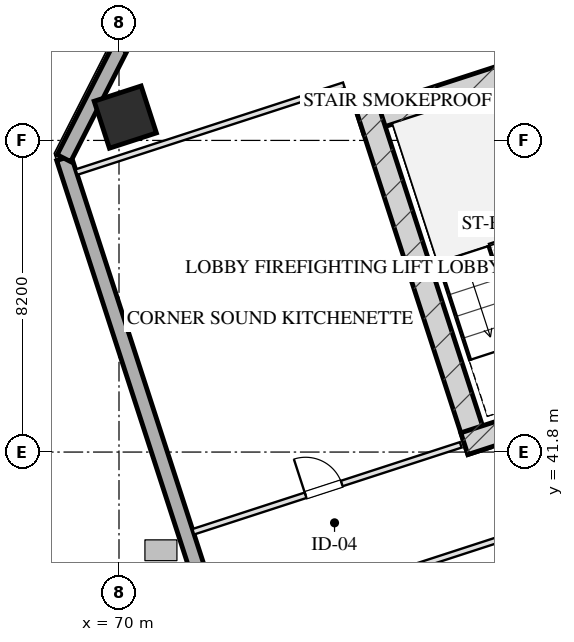
"""IFC4 building model, lengths in metres.
Left out: names, types, materials, properties, quantities, classifications, styles, units other than length and angle.
Written with IfcOpenShell. Run it as: python <this file> out.ifc"""

import sys

from ifc_helpers import new_model, si_unit, direction, frame, frame_2d, origin, origin_2d, place, context, subcontext, project, spatial, rectangle, hollow_rectangle, extrude, element, fill, save


model = new_model("IFC4")
c1 = context("Model", 3, precision=1e-05, world=origin(), true_north=direction((0.0, 1.0)))
c2 = subcontext(c1, "Body", "Model", "MODEL_VIEW")
j1 = project(units=[si_unit("LENGTHUNIT", "METRE"), si_unit("PLANEANGLEUNIT", "RADIAN")], contexts=[c1])
p1 = place(None, origin())
s1 = spatial("IfcSite", under=j1, at=p1, CompositionType="ELEMENT")
p2 = place(p1, origin())
s2 = spatial("IfcBuilding", under=s1, at=p2, CompositionType="ELEMENT")
p3 = place(p2, frame((0.0, 0.0, 173.65)))
s3 = spatial("IfcBuildingStorey", under=s2, at=p3, CompositionType="ELEMENT", Elevation=173.65)
p4 = place(p3, frame((76.344, 50.466, 0.0), z_axis=(0.0, 0.0, 1.0), x_axis=(0.951055727519, 0.309019421968, 0.0)))
e1 = element("IfcWall", 1, at=p4, inside=s3, PredefinedType="SHEAR", context=c2, shape_type="SweptSolid", body=[
    extrude(rectangle(XDim=16.4, YDim=0.6, at=frame_2d((8.2, 0.0))), origin(), (0.0, 0.0, 1.0), 3.45),
])
p5 = place(p3, frame((79.466, 41.828, 0.0), z_axis=(0.0, 0.0, 1.0), x_axis=(-0.309041232772, 0.951048640421, 0.0)))
e2 = element("IfcWall", 2, at=p5, inside=s3, PredefinedType="SHEAR", context=c2, shape_type="SweptSolid", body=[
    extrude(rectangle(XDim=9.48, YDim=0.6, at=frame_2d((4.74, 0.0))), origin(), (0.0, 0.0, 1.0), 3.45),
])
p6 = place(p3, frame((79.087, 42.021, 0.0), z_axis=(0.0, 0.0, 1.0), x_axis=(0.951062550203, 0.3089984233, 0.0)))
e3 = element("IfcWall", 3, at=p6, inside=s3, PredefinedType="SHEAR", context=c2, shape_type="SweptSolid", body=[
    extrude(rectangle(XDim=4.22, YDim=0.6, at=frame_2d((2.11, 0.0))), origin(), (0.0, 0.0, 1.0), 3.45),
])
p7 = place(p3, frame((70.165, 50.614, 0.0), z_axis=(0.0, 0.0, 1.0), x_axis=(0.951056516295, 0.309016994375, 0.0)))
e4 = element("IfcColumn", 4, at=p7, inside=s3, PredefinedType="COLUMN", context=c2, shape_type="SweptSolid", body=[
    extrude(hollow_rectangle(XDim=1.3, YDim=1.3, WallThickness=0.045, at=origin_2d()), origin(), (0.0, 0.0, 1.0), 3.451),
])
p8 = place(p3, frame((81.776, 8.827, 0.0), z_axis=(0.0, 0.0, 1.0), x_axis=(-0.309014228706, 0.951057414911, 0.0)))
e5 = element("IfcWall", 5, at=p8, inside=s3, PredefinedType="SOLIDWALL", context=c2, shape_type="SweptSolid", body=[
    extrude(rectangle(XDim=42.8, YDim=0.4, at=frame_2d((21.4, 0.0))), origin(), (0.0, 0.0, 1.0), 2.61),
])
p9 = place(p8, frame((18.25, 0.0, 0.0)))
e6 = element("IfcOpeningElement", 6, at=p9, cuts=e5, PredefinedType="OPENING", context=c2, shape_type="SweptSolid", body=[
    extrude(rectangle(XDim=1.1, YDim=2.15, at=frame_2d((0.55, 1.075))), frame((0.0, 0.21, 0.0), z_axis=(0.0, -1.0, 0.0), x_axis=(1.0, 0.0, 0.0)), (0.0, 0.0, 1.0), 0.42),
])
p10 = place(p3, frame((68.551, 49.532, 0.0), z_axis=(0.0, 0.0, 1.0), x_axis=(0.454019523198, 0.890991735402, 0.0)))
e7 = element("IfcWall", 7, at=p10, inside=s3, PredefinedType="SOLIDWALL", context=c2, shape_type="SweptSolid", body=[
    extrude(rectangle(XDim=3.394, YDim=0.4, at=frame_2d((1.697, 0.0))), origin(), (0.0, 0.0, 1.0), 2.61),
])
p11 = place(p3, frame((68.88, 49.166, 0.0), z_axis=(0.0, 0.0, 1.0), x_axis=(0.951060977215, 0.309003264738, 0.0)))
e8 = element("IfcWall", 8, at=p11, inside=s3, PredefinedType="PARTITIONING", context=c2, shape_type="SweptSolid", body=[
    extrude(rectangle(XDim=7.4, YDim=0.15, at=frame_2d((3.7, 0.0))), origin(), (0.0, 0.0, 1.0), 3.175),
])
p12 = place(p3, frame((71.955, 39.703, 0.0), z_axis=(0.0, 0.0, 1.0), x_axis=(0.951060977215, 0.309003264738, 0.0)))
e9 = element("IfcWall", 9, at=p12, inside=s3, PredefinedType="PARTITIONING", context=c2, shape_type="SweptSolid", body=[
    extrude(rectangle(XDim=7.4, YDim=0.15, at=frame_2d((3.7, 0.0))), origin(), (0.0, 0.0, 1.0), 3.175),
])
p13 = place(p12, frame((3.108, 0.0, 0.0)))
e10 = element("IfcOpeningElement", 10, at=p13, cuts=e9, PredefinedType="OPENING", context=c2, shape_type="SweptSolid", body=[
    extrude(rectangle(XDim=1.0, YDim=2.05, at=frame_2d((0.5, 1.025))), frame((0.0, 0.085, 0.0), z_axis=(0.0, -1.0, 0.0), x_axis=(1.0, 0.0, 0.0)), (0.0, 0.0, 1.0), 0.17),
])
p14 = place(p3, frame((72.783, 37.154, 0.0), z_axis=(0.0, 0.0, 1.0), x_axis=(0.951056999652, 0.309015506751, 0.0)))
e11 = element("IfcWall", 11, at=p14, inside=s3, PredefinedType="PARTITIONING", context=c2, shape_type="SweptSolid", body=[
    extrude(rectangle(XDim=11.5, YDim=0.15, at=frame_2d((5.75, 0.0))), origin(), (0.0, 0.0, 1.0), 3.175),
])
p15 = place(p13, origin())
e12 = element("IfcDoor", 12, at=p15, inside=s3, OperationType="SINGLE_SWING_LEFT", PredefinedType="DOOR", context=c2, shape_type="SweptSolid", body=[
    extrude(rectangle(XDim=1.0, YDim=2.05, at=frame_2d((0.5, 1.025))), frame((0.0, 0.025, 0.0), z_axis=(0.0, -1.0, 0.0), x_axis=(1.0, 0.0, 0.0)), (0.0, 0.0, 1.0), 0.05),
])
fill(e10, e12)
save(model, sys.argv[1])
